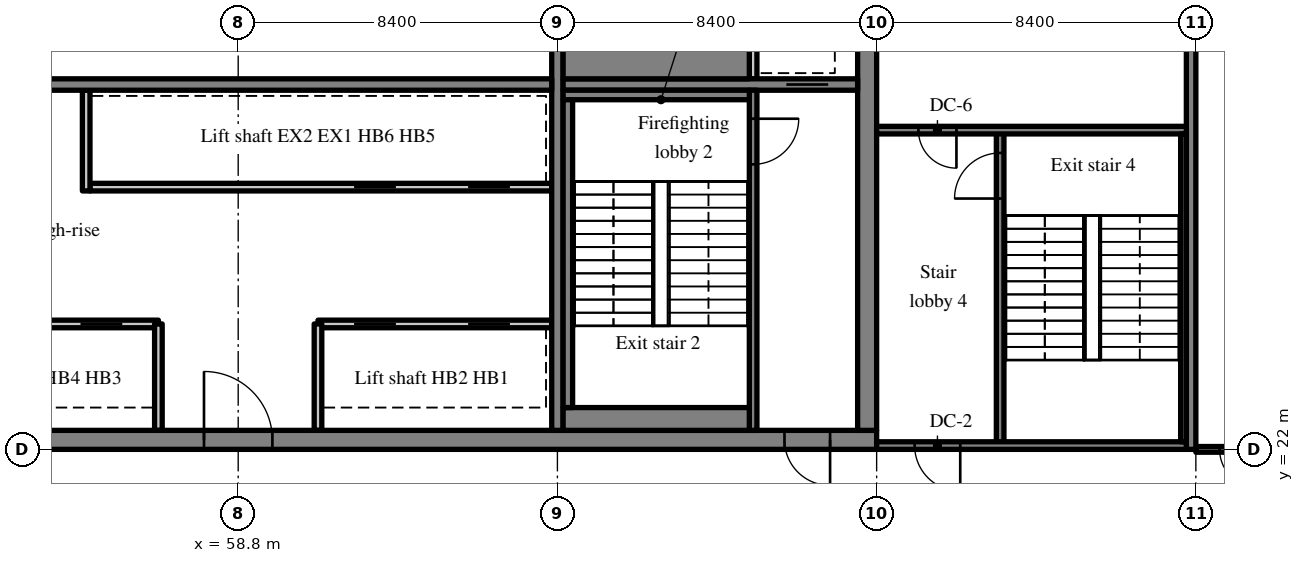
"""IFC4 building model, lengths in metres.
Left out: names, types, materials, properties, quantities, classifications, styles, units other than length and angle.
Written with IfcOpenShell. Run it as: python <this file> out.ifc"""

import sys

from ifc_helpers import new_model, si_unit, direction, frame, frame_2d, origin, place, context, subcontext, project, spatial, rectangle, extrude, source, transform, mapped, element, fill, save


model = new_model("IFC4")
c1 = context("Model", 3, precision=1e-05, world=origin(), true_north=direction((0.0, 1.0)))
c2 = subcontext(c1, "Body", "Model", "MODEL_VIEW")
j1 = project(units=[si_unit("LENGTHUNIT", "METRE"), si_unit("PLANEANGLEUNIT", "RADIAN")], contexts=[c1])
p1 = place(None, origin())
s1 = spatial("IfcSite", under=j1, at=p1, CompositionType="ELEMENT")
p2 = place(p1, origin())
s2 = spatial("IfcBuilding", under=s1, at=p2, CompositionType="ELEMENT")
p3 = place(p2, frame((0.0, 0.0, 309.7)))
s3 = spatial("IfcBuildingStorey", under=s2, at=p3, CompositionType="ELEMENT", Elevation=309.7)
m1 = source(origin(), c2, "Body", "SweptSolid", [
    extrude(rectangle(XDim=50.4, YDim=0.5, at=frame_2d((25.2, 0.0))), origin(), (0.0, 0.0, 1.0), 3.72),
])
p4 = place(p3, frame((25.2, 22.25, 0.0), z_axis=(0.0, 0.0, 1.0), x_axis=(1.0, 0.0, 0.0)))
e1 = element("IfcWall", 1, at=p4, inside=s3, PredefinedType="SHEAR", context=c2, shape_type="MappedRepresentation", body=[
    mapped(m1, transform((0.0, 0.0, 0.0), scale=1.0)),
])
m2 = source(origin(), c2, "Body", "SweptSolid", [
    extrude(rectangle(XDim=1.8, YDim=2.1, at=frame_2d((0.9, 1.05))), frame((0.0, 0.26, 0.0), z_axis=(0.0, -1.0, 0.0), x_axis=(1.0, 0.0, 0.0)), (0.0, 0.0, 1.0), 0.52),
])
p5 = place(p4, frame((15.9, 0.0, 0.0)))
e2 = element("IfcOpeningElement", 2, at=p5, cuts=e1, PredefinedType="OPENING", context=c2, shape_type="MappedRepresentation", body=[
    mapped(m2, transform((0.0, 0.0, 0.0), scale=1.0)),
])
m3 = source(origin(), c2, "Body", "SweptSolid", [
    extrude(rectangle(XDim=0.9, YDim=2.1, at=frame_2d((0.45, 1.05))), frame((0.0, 0.26, 0.0), z_axis=(0.0, -1.0, 0.0), x_axis=(1.0, 0.0, 0.0)), (0.0, 0.0, 1.0), 0.52),
])
p6 = place(p4, frame((11.175, 0.0, 0.0)))
e3 = element("IfcOpeningElement", 3, at=p6, cuts=e1, PredefinedType="OPENING", context=c2, shape_type="MappedRepresentation", body=[
    mapped(m3, transform((0.0, 0.0, 0.0), scale=1.0)),
])
p7 = place(p4, frame((21.525, 0.0, 0.0)))
e4 = element("IfcOpeningElement", 4, at=p7, cuts=e1, PredefinedType="OPENING", context=c2, shape_type="MappedRepresentation", body=[
    mapped(m3, transform((0.0, 0.0, 0.0), scale=1.0)),
])
p8 = place(p4, frame((32.7, 0.0, 0.0)))
e5 = element("IfcOpeningElement", 5, at=p8, cuts=e1, PredefinedType="OPENING", context=c2, shape_type="MappedRepresentation", body=[
    mapped(m2, transform((0.0, 0.0, 0.0), scale=1.0)),
])
m4 = source(origin(), c2, "Body", "SweptSolid", [
    extrude(rectangle(XDim=1.2, YDim=2.1, at=frame_2d((0.6, 1.05))), frame((0.0, 0.26, 0.0), z_axis=(0.0, -1.0, 0.0), x_axis=(1.0, 0.0, 0.0)), (0.0, 0.0, 1.0), 0.52),
])
p9 = place(p4, frame((6.5, 0.0, 0.0)))
e6 = element("IfcOpeningElement", 6, at=p9, cuts=e1, PredefinedType="OPENING", context=c2, shape_type="MappedRepresentation", body=[
    mapped(m4, transform((0.0, 0.0, 0.0), scale=1.0)),
])
p10 = place(p4, frame((47.975, 0.0, 0.0)))
e7 = element("IfcOpeningElement", 7, at=p10, cuts=e1, PredefinedType="OPENING", context=c2, shape_type="MappedRepresentation", body=[
    mapped(m4, transform((0.0, 0.0, 0.0), scale=1.0)),
])
m5 = source(origin(), c2, "Body", "SweptSolid", [
    extrude(rectangle(XDim=19.0, YDim=0.5, at=frame_2d((9.5, 0.0))), origin(), (0.0, 0.0, 1.0), 3.72),
])
p11 = place(p3, frame((75.35, 22.5, 0.0), z_axis=(0.0, 0.0, 1.0), x_axis=(0.0, 1.0, 0.0)))
e8 = element("IfcWall", 8, at=p11, inside=s3, PredefinedType="SHEAR", context=c2, shape_type="MappedRepresentation", body=[
    mapped(m5, transform((0.0, 0.0, 0.0), scale=1.0)),
])
p12 = place(p11, frame((12.9, 0.0, 0.0)))
e9 = element("IfcOpeningElement", 9, at=p12, cuts=e8, PredefinedType="OPENING", context=c2, shape_type="MappedRepresentation", body=[
    mapped(m4, transform((0.0, 0.0, 0.0), scale=1.0)),
])
m6 = source(origin(), c2, "Body", "SweptSolid", [
    extrude(rectangle(XDim=19.0, YDim=0.3, at=frame_2d((9.5, 0.0))), origin(), (0.0, 0.0, 1.0), 3.72),
])
p13 = place(p3, frame((67.2, 22.5, 0.0), z_axis=(0.0, 0.0, 1.0), x_axis=(0.0, 1.0, 0.0)))
e10 = element("IfcWall", 10, at=p13, inside=s3, PredefinedType="SHEAR", context=c2, shape_type="MappedRepresentation", body=[
    mapped(m6, transform((0.0, 0.0, 0.0), scale=1.0)),
])
m7 = source(origin(), c2, "Body", "SweptSolid", [
    extrude(rectangle(XDim=16.5, YDim=0.3, at=frame_2d((8.25, 0.0))), origin(), (0.0, 0.0, 1.0), 3.72),
])
p14 = place(p3, frame((50.55, 31.6, 0.0), z_axis=(0.0, 0.0, 1.0), x_axis=(1.0, 0.0, 0.0)))
e11 = element("IfcWall", 11, at=p14, inside=s3, PredefinedType="SHEAR", context=c2, shape_type="MappedRepresentation", body=[
    mapped(m7, transform((0.0, 0.0, 0.0), scale=1.0)),
])
m8 = source(origin(), c2, "Body", "SweptSolid", [
    extrude(rectangle(XDim=1.0, YDim=2.1, at=frame_2d((0.5, 1.05))), frame((0.0, 0.16, 0.0), z_axis=(0.0, -1.0, 0.0), x_axis=(1.0, 0.0, 0.0)), (0.0, 0.0, 1.0), 0.32),
])
p15 = place(p14, frame((0.625, 0.0, 0.0)))
e12 = element("IfcOpeningElement", 12, at=p15, cuts=e11, PredefinedType="OPENING", context=c2, shape_type="MappedRepresentation", body=[
    mapped(m8, transform((0.0, 0.0, 0.0), scale=1.0)),
])
m9 = source(origin(), c2, "Body", "SweptSolid", [
    extrude(rectangle(XDim=7.75, YDim=0.3, at=frame_2d((3.875, 0.0))), origin(), (0.0, 0.0, 1.0), 3.72),
])
p16 = place(p3, frame((67.35, 31.6, 0.0), z_axis=(0.0, 0.0, 1.0), x_axis=(1.0, 0.0, 0.0)))
e13 = element("IfcWall", 13, at=p16, inside=s3, PredefinedType="SHEAR", context=c2, shape_type="MappedRepresentation", body=[
    mapped(m9, transform((0.0, 0.0, 0.0), scale=1.0)),
])
m10 = source(origin(), c2, "Body", "SweptSolid", [
    extrude(rectangle(XDim=1.1, YDim=2.1, at=frame_2d((0.55, 1.05))), frame((0.0, 0.16, 0.0), z_axis=(0.0, -1.0, 0.0), x_axis=(1.0, 0.0, 0.0)), (0.0, 0.0, 1.0), 0.32),
])
p17 = place(p16, frame((5.875, 0.0, 0.0)))
e14 = element("IfcOpeningElement", 14, at=p17, cuts=e13, PredefinedType="OPENING", context=c2, shape_type="MappedRepresentation", body=[
    mapped(m10, transform((0.0, 0.0, 0.0), scale=1.0)),
])
m11 = source(origin(), c2, "Body", "SweptSolid", [
    extrude(rectangle(XDim=18.4, YDim=0.25, at=frame_2d((9.2, 0.0))), origin(), (0.0, 0.0, 1.0), 3.72),
])
p18 = place(p3, frame((83.875, 22.0, 0.0), z_axis=(0.0, 0.0, 1.0), x_axis=(0.0, 1.0, 0.0)))
e15 = element("IfcWall", 15, at=p18, inside=s3, PredefinedType="SHEAR", context=c2, shape_type="MappedRepresentation", body=[
    mapped(m11, transform((0.0, 0.0, 0.0), scale=1.0)),
])
m12 = source(origin(), c2, "Body", "SweptSolid", [
    extrude(rectangle(XDim=6.15, YDim=0.2, at=frame_2d((3.075, 0.0))), origin(), (0.0, 0.0, 1.0), 3.72),
])
p19 = place(p3, frame((67.05, 25.3, 0.0), z_axis=(0.0, 0.0, 1.0), x_axis=(-1.0, 0.0, 0.0)))
e16 = element("IfcWall", 16, at=p19, inside=s3, PredefinedType="SOLIDWALL", context=c2, shape_type="MappedRepresentation", body=[
    mapped(m12, transform((0.0, 0.0, 0.0), scale=1.0)),
])
m13 = source(origin(), c2, "Body", "SweptSolid", [
    extrude(rectangle(XDim=1.1, YDim=2.1, at=frame_2d((0.55, 1.05))), frame((0.0, 0.11, 0.0), z_axis=(0.0, -1.0, 0.0), x_axis=(1.0, 0.0, 0.0)), (0.0, 0.0, 1.0), 0.22),
])
p20 = place(p19, frame((1.1, 0.0, 0.0)))
e17 = element("IfcOpeningElement", 17, at=p20, cuts=e16, PredefinedType="OPENING", context=c2, shape_type="MappedRepresentation", body=[
    mapped(m13, transform((0.0, 0.0, 0.0), scale=1.0)),
])
p21 = place(p19, frame((4.1, 0.0, 0.0)))
e18 = element("IfcOpeningElement", 18, at=p21, cuts=e16, PredefinedType="OPENING", context=c2, shape_type="MappedRepresentation", body=[
    mapped(m13, transform((0.0, 0.0, 0.0), scale=1.0)),
])
m14 = source(origin(), c2, "Body", "SweptSolid", [
    extrude(rectangle(XDim=6.0, YDim=0.2, at=frame_2d((3.0, 0.0))), origin(), (0.0, 0.0, 1.0), 3.72),
])
p22 = place(p3, frame((56.7, 25.3, 0.0), z_axis=(0.0, 0.0, 1.0), x_axis=(-1.0, 0.0, 0.0)))
e19 = element("IfcWall", 19, at=p22, inside=s3, PredefinedType="SOLIDWALL", context=c2, shape_type="MappedRepresentation", body=[
    mapped(m14, transform((0.0, 0.0, 0.0), scale=1.0)),
])
p23 = place(p22, frame((0.95, 0.0, 0.0)))
e20 = element("IfcOpeningElement", 20, at=p23, cuts=e19, PredefinedType="OPENING", context=c2, shape_type="MappedRepresentation", body=[
    mapped(m13, transform((0.0, 0.0, 0.0), scale=1.0)),
])
p24 = place(p22, frame((3.95, 0.0, 0.0)))
e21 = element("IfcOpeningElement", 21, at=p24, cuts=e19, PredefinedType="OPENING", context=c2, shape_type="MappedRepresentation", body=[
    mapped(m13, transform((0.0, 0.0, 0.0), scale=1.0)),
])
m15 = source(origin(), c2, "Body", "SweptSolid", [
    extrude(rectangle(XDim=12.15, YDim=0.2, at=frame_2d((6.075, 0.0))), origin(), (0.0, 0.0, 1.0), 3.72),
])
p25 = place(p3, frame((67.05, 28.9, 0.0), z_axis=(0.0, 0.0, 1.0), x_axis=(-1.0, 0.0, 0.0)))
e22 = element("IfcWall", 22, at=p25, inside=s3, PredefinedType="SOLIDWALL", context=c2, shape_type="MappedRepresentation", body=[
    mapped(m15, transform((0.0, 0.0, 0.0), scale=1.0)),
])
p26 = place(p25, frame((1.1, 0.0, 0.0)))
e23 = element("IfcOpeningElement", 23, at=p26, cuts=e22, PredefinedType="OPENING", context=c2, shape_type="MappedRepresentation", body=[
    mapped(m13, transform((0.0, 0.0, 0.0), scale=1.0)),
])
p27 = place(p25, frame((4.1, 0.0, 0.0)))
e24 = element("IfcOpeningElement", 24, at=p27, cuts=e22, PredefinedType="OPENING", context=c2, shape_type="MappedRepresentation", body=[
    mapped(m13, transform((0.0, 0.0, 0.0), scale=1.0)),
])
m16 = source(origin(), c2, "Body", "SweptSolid", [
    extrude(rectangle(XDim=2.8, YDim=0.2, at=frame_2d((1.4, 0.0))), origin(), (0.0, 0.0, 1.0), 3.72),
])
for number, where, z_axis, x_axis in (
    (25, (60.9, 22.5, 0.0), (0.0, 0.0, 1.0), (0.0, 1.0, 0.0)),
    (26, (56.7, 22.5, 0.0), (0.0, 0.0, 1.0), (0.0, 1.0, 0.0)),
):
    element("IfcWall", number, at=place(p3, frame(where, z_axis=z_axis, x_axis=x_axis)), inside=s3, PredefinedType="SOLIDWALL", context=c2, shape_type="MappedRepresentation", body=[
        mapped(m16, transform((0.0, 0.0, 0.0), scale=1.0)),
    ])
m17 = source(origin(), c2, "Body", "SweptSolid", [
    extrude(rectangle(XDim=2.65, YDim=0.2, at=frame_2d((1.325, 0.0))), origin(), (0.0, 0.0, 1.0), 3.72),
])
p28 = place(p3, frame((54.8, 28.8, 0.0), z_axis=(0.0, 0.0, 1.0), x_axis=(0.0, 1.0, 0.0)))
e27 = element("IfcWall", 27, at=p28, inside=s3, PredefinedType="SOLIDWALL", context=c2, shape_type="MappedRepresentation", body=[
    mapped(m17, transform((0.0, 0.0, 0.0), scale=1.0)),
])
m18 = source(origin(), c2, "Body", "SweptSolid", [
    extrude(rectangle(XDim=8.95, YDim=0.2, at=frame_2d((4.475, 0.0))), origin(), (0.0, 0.0, 1.0), 3.72),
])
p29 = place(p3, frame((72.35, 22.5, 0.0), z_axis=(0.0, 0.0, 1.0), x_axis=(0.0, 1.0, 0.0)))
e28 = element("IfcWall", 28, at=p29, inside=s3, PredefinedType="SOLIDWALL", context=c2, shape_type="MappedRepresentation", body=[
    mapped(m18, transform((0.0, 0.0, 0.0), scale=1.0)),
])
m19 = source(origin(), c2, "Body", "SweptSolid", [
    extrude(rectangle(XDim=1.2, YDim=2.1, at=frame_2d((0.6, 1.05))), frame((0.0, 0.11, 0.0), z_axis=(0.0, -1.0, 0.0), x_axis=(1.0, 0.0, 0.0)), (0.0, 0.0, 1.0), 0.22),
])
p30 = place(p29, frame((7.0, 0.0, 0.0)))
e29 = element("IfcOpeningElement", 29, at=p30, cuts=e28, PredefinedType="OPENING", context=c2, shape_type="MappedRepresentation", body=[
    mapped(m19, transform((0.0, 0.0, 0.0), scale=1.0)),
])
m20 = source(origin(), c2, "Body", "SweptSolid", [
    extrude(rectangle(XDim=1.85, YDim=0.2, at=frame_2d((0.925, 0.0))), origin(), (0.0, 0.0, 1.0), 3.72),
])
p31 = place(p3, frame((72.35, 31.75, 0.0), z_axis=(0.0, 0.0, 1.0), x_axis=(0.0, 1.0, 0.0)))
e30 = element("IfcWall", 30, at=p31, inside=s3, PredefinedType="SOLIDWALL", context=c2, shape_type="MappedRepresentation", body=[
    mapped(m20, transform((0.0, 0.0, 0.0), scale=1.0)),
])
m21 = source(origin(), c2, "Body", "SweptSolid", [
    extrude(rectangle(XDim=8.3, YDim=0.2, at=frame_2d((4.15, 0.0))), origin(), (0.0, 0.0, 1.0), 3.72),
])
p32 = place(p3, frame((78.85, 22.1, 0.0), z_axis=(0.0, 0.0, 1.0), x_axis=(0.0, 1.0, 0.0)))
e31 = element("IfcWall", 31, at=p32, inside=s3, PredefinedType="SOLIDWALL", context=c2, shape_type="MappedRepresentation", body=[
    mapped(m21, transform((0.0, 0.0, 0.0), scale=1.0)),
])
p33 = place(p32, frame((6.5, 0.0, 0.0)))
e32 = element("IfcOpeningElement", 32, at=p33, cuts=e31, PredefinedType="OPENING", context=c2, shape_type="MappedRepresentation", body=[
    mapped(m19, transform((0.0, 0.0, 0.0), scale=1.0)),
])
m22 = source(origin(), c2, "Body", "SweptSolid", [
    extrude(rectangle(XDim=8.15, YDim=0.2, at=frame_2d((4.075, 0.0))), origin(), (0.0, 0.0, 1.0), 3.72),
])
p34 = place(p3, frame((83.75, 22.1, 0.0), z_axis=(0.0, 0.0, 1.0), x_axis=(-1.0, 0.0, 0.0)))
e33 = element("IfcWall", 33, at=p34, inside=s3, PredefinedType="SOLIDWALL", context=c2, shape_type="MappedRepresentation", body=[
    mapped(m22, transform((0.0, 0.0, 0.0), scale=1.0)),
])
p35 = place(p34, frame((5.95, 0.0, 0.0)))
e34 = element("IfcOpeningElement", 34, at=p35, cuts=e33, PredefinedType="OPENING", context=c2, shape_type="MappedRepresentation", body=[
    mapped(m19, transform((0.0, 0.0, 0.0), scale=1.0)),
])
p36 = place(p3, frame((83.75, 30.4, 0.0), z_axis=(0.0, 0.0, 1.0), x_axis=(-1.0, 0.0, 0.0)))
e35 = element("IfcWall", 35, at=p36, inside=s3, PredefinedType="SOLIDWALL", context=c2, shape_type="MappedRepresentation", body=[
    mapped(m22, transform((0.0, 0.0, 0.0), scale=1.0)),
])
m23 = source(origin(), c2, "Body", "SweptSolid", [
    extrude(rectangle(XDim=1.0, YDim=2.1, at=frame_2d((0.5, 1.05))), frame((0.0, 0.11, 0.0), z_axis=(0.0, -1.0, 0.0), x_axis=(1.0, 0.0, 0.0)), (0.0, 0.0, 1.0), 0.22),
])
p37 = place(p36, frame((6.05, 0.0, 0.0)))
e36 = element("IfcOpeningElement", 36, at=p37, cuts=e35, PredefinedType="OPENING", context=c2, shape_type="MappedRepresentation", body=[
    mapped(m23, transform((0.0, 0.0, 0.0), scale=1.0)),
])
m24 = source(origin(), c2, "Body", "SweptSolid", [
    extrude(rectangle(XDim=4.9, YDim=0.6, at=frame_2d((2.45, 0.0))), origin(), (0.0, 0.0, 1.0), 3.72),
])
p38 = place(p3, frame((67.35, 22.8, 0.0), z_axis=(0.0, 0.0, 1.0), x_axis=(1.0, 0.0, 0.0)))
e37 = element("IfcWall", 37, at=p38, inside=s3, PredefinedType="SOLIDWALL", context=c2, shape_type="MappedRepresentation", body=[
    mapped(m24, transform((0.0, 0.0, 0.0), scale=1.0)),
])
m25 = source(origin(), c2, "Body", "SweptSolid", [
    extrude(rectangle(XDim=4.9, YDim=0.25, at=frame_2d((2.45, 0.0))), origin(), (0.0, 0.0, 1.0), 3.72),
])
p39 = place(p3, frame((67.35, 31.325, 0.0), z_axis=(0.0, 0.0, 1.0), x_axis=(1.0, 0.0, 0.0)))
e38 = element("IfcWall", 38, at=p39, inside=s3, PredefinedType="SOLIDWALL", context=c2, shape_type="MappedRepresentation", body=[
    mapped(m25, transform((0.0, 0.0, 0.0), scale=1.0)),
])
m26 = source(origin(), c2, "Body", "SweptSolid", [
    extrude(rectangle(XDim=8.1, YDim=0.25, at=frame_2d((4.05, 0.0))), origin(), (0.0, 0.0, 1.0), 3.72),
])
p40 = place(p3, frame((67.475, 23.1, 0.0), z_axis=(0.0, 0.0, 1.0), x_axis=(0.0, 1.0, 0.0)))
e39 = element("IfcWall", 39, at=p40, inside=s3, PredefinedType="SOLIDWALL", context=c2, shape_type="MappedRepresentation", body=[
    mapped(m26, transform((0.0, 0.0, 0.0), scale=1.0)),
])
m27 = source(origin(), c2, "Body", "SweptSolid", [
    extrude(rectangle(XDim=4.9, YDim=1.05, at=frame_2d((2.45, 0.0))), origin(), (0.0, 0.0, 1.0), 3.72),
])
p41 = place(p3, frame((67.35, 32.275, 0.0), z_axis=(0.0, 0.0, 1.0), x_axis=(1.0, 0.0, 0.0)))
e40 = element("IfcWall", 40, at=p41, inside=s3, PredefinedType="SOLIDWALL", context=c2, shape_type="MappedRepresentation", body=[
    mapped(m27, transform((0.0, 0.0, 0.0), scale=1.0)),
])
m28 = source(origin(), c2, "Body", "SweptSolid", [
    extrude(rectangle(XDim=8.1, YDim=0.15, at=frame_2d((4.05, 0.0))), origin(), (0.0, 0.0, 1.0), 3.72),
])
p42 = place(p3, frame((83.675, 22.2, 0.0), z_axis=(0.0, 0.0, 1.0), x_axis=(0.0, 1.0, 0.0)))
e41 = element("IfcWall", 41, at=p42, inside=s3, PredefinedType="SOLIDWALL", context=c2, shape_type="MappedRepresentation", body=[
    mapped(m28, transform((0.0, 0.0, 0.0), scale=1.0)),
])
m29 = source(origin(), c2, "Body", "SweptSolid", [
    extrude(rectangle(XDim=1.9, YDim=0.15, at=frame_2d((0.95, 0.0))), origin(), (0.0, 0.0, 1.0), 3.02),
])
p43 = place(p3, frame((84.0, 22.0, 0.0), z_axis=(0.0, 0.0, 1.0), x_axis=(1.0, 0.0, 0.0)))
e42 = element("IfcWall", 42, at=p43, inside=s3, PredefinedType="PARTITIONING", context=c2, shape_type="MappedRepresentation", body=[
    mapped(m29, transform((0.0, 0.0, 0.0), scale=1.0)),
])
m30 = source(origin(), c2, "Body", "SweptSolid", [
    extrude(rectangle(XDim=1.0, YDim=2.1, at=frame_2d((0.5, 1.05))), frame((0.0, 0.085, 0.0), z_axis=(0.0, -1.0, 0.0), x_axis=(1.0, 0.0, 0.0)), (0.0, 0.0, 1.0), 0.17),
])
p44 = place(p43, frame((0.625, 0.0, 0.0)))
e43 = element("IfcOpeningElement", 43, at=p44, cuts=e42, PredefinedType="OPENING", context=c2, shape_type="MappedRepresentation", body=[
    mapped(m30, transform((0.0, 0.0, 0.0), scale=1.0)),
])
m31 = source(origin(), c2, "Body", "SweptSolid", [
    extrude(rectangle(XDim=1.8, YDim=2.1, at=frame_2d((0.9, 1.05))), frame((0.0, 0.175, 0.0), z_axis=(0.0, -1.0, 0.0), x_axis=(1.0, 0.0, 0.0)), (0.0, 0.0, 1.0), 0.05),
])
p45 = place(p8, origin())
e44 = element("IfcDoor", 44, at=p45, inside=s3, OperationType="DOUBLE_DOOR_SINGLE_SWING", PredefinedType="DOOR", context=c2, shape_type="MappedRepresentation", body=[
    mapped(m31, transform((0.0, 0.0, 0.0), scale=1.0)),
])
fill(e5, e44)
m32 = source(origin(), c2, "Body", "SweptSolid", [
    extrude(rectangle(XDim=1.1, YDim=2.1, at=frame_2d((0.55, 1.05))), frame((0.0, 0.025, 0.0), z_axis=(0.0, -1.0, 0.0), x_axis=(1.0, 0.0, 0.0)), (0.0, 0.0, 1.0), 0.05),
])
p46 = place(p20, origin())
e45 = element("IfcDoor", 45, at=p46, inside=s3, OperationType="SLIDING_TO_RIGHT", PredefinedType="DOOR", context=c2, shape_type="MappedRepresentation", body=[
    mapped(m32, transform((0.0, 0.0, 0.0), scale=1.0)),
])
fill(e17, e45)
p47 = place(p21, origin())
e46 = element("IfcDoor", 46, at=p47, inside=s3, OperationType="SLIDING_TO_LEFT", PredefinedType="DOOR", context=c2, shape_type="MappedRepresentation", body=[
    mapped(m32, transform((0.0, 0.0, 0.0), scale=1.0)),
])
fill(e18, e46)
p48 = place(p23, origin())
e47 = element("IfcDoor", 47, at=p48, inside=s3, OperationType="SLIDING_TO_RIGHT", PredefinedType="DOOR", context=c2, shape_type="MappedRepresentation", body=[
    mapped(m32, transform((0.0, 0.0, 0.0), scale=1.0)),
])
fill(e20, e47)
p49 = place(p26, origin())
e48 = element("IfcDoor", 48, at=p49, inside=s3, OperationType="SLIDING_TO_RIGHT", PredefinedType="DOOR", context=c2, shape_type="MappedRepresentation", body=[
    mapped(m32, transform((0.0, 0.0, 0.0), scale=1.0)),
])
fill(e23, e48)
p50 = place(p27, origin())
e49 = element("IfcDoor", 49, at=p50, inside=s3, OperationType="SLIDING_TO_LEFT", PredefinedType="DOOR", context=c2, shape_type="MappedRepresentation", body=[
    mapped(m32, transform((0.0, 0.0, 0.0), scale=1.0)),
])
fill(e24, e49)
m33 = source(origin(), c2, "Body", "SweptSolid", [
    extrude(rectangle(XDim=1.2, YDim=2.1, at=frame_2d((0.6, 1.05))), frame((0.0, 0.025, 0.0), z_axis=(0.0, -1.0, 0.0), x_axis=(1.0, 0.0, 0.0)), (0.0, 0.0, 1.0), 0.05),
])
p51 = place(p30, origin())
e50 = element("IfcDoor", 50, at=p51, inside=s3, OperationType="SINGLE_SWING_RIGHT", PredefinedType="DOOR", context=c2, shape_type="MappedRepresentation", body=[
    mapped(m33, transform((0.0, 0.0, 0.0), scale=1.0)),
])
fill(e29, e50)
m34 = source(origin(), c2, "Body", "SweptSolid", [
    extrude(rectangle(XDim=1.2, YDim=2.1, at=frame_2d((0.6, 1.05))), frame((0.0, 0.175, 0.0), z_axis=(0.0, -1.0, 0.0), x_axis=(1.0, 0.0, 0.0)), (0.0, 0.0, 1.0), 0.05),
])
p52 = place(p10, origin())
e51 = element("IfcDoor", 51, at=p52, inside=s3, OperationType="SINGLE_SWING_RIGHT", PredefinedType="DOOR", context=c2, shape_type="MappedRepresentation", body=[
    mapped(m34, transform((0.0, 0.0, 0.0), scale=1.0)),
])
fill(e7, e51)
p53 = place(p17, origin())
e52 = element("IfcDoor", 52, at=p53, inside=s3, OperationType="SLIDING_TO_LEFT", PredefinedType="DOOR", context=c2, shape_type="MappedRepresentation", body=[
    mapped(m32, transform((0.0, 0.0, 0.0), scale=1.0)),
])
fill(e14, e52)
p54 = place(p33, origin())
e53 = element("IfcDoor", 53, at=p54, inside=s3, OperationType="SINGLE_SWING_LEFT", PredefinedType="DOOR", context=c2, shape_type="MappedRepresentation", body=[
    mapped(m33, transform((0.0, 0.0, 0.0), scale=1.0)),
])
fill(e32, e53)
p55 = place(p35, origin())
e54 = element("IfcDoor", 54, at=p55, inside=s3, OperationType="SINGLE_SWING_LEFT", PredefinedType="DOOR", context=c2, shape_type="MappedRepresentation", body=[
    mapped(m33, transform((0.0, 0.0, 0.0), scale=1.0)),
])
fill(e34, e54)
m35 = source(origin(), c2, "Body", "SweptSolid", [
    extrude(rectangle(XDim=1.0, YDim=2.1, at=frame_2d((0.5, 1.05))), frame((0.0, 0.025, 0.0), z_axis=(0.0, -1.0, 0.0), x_axis=(1.0, 0.0, 0.0)), (0.0, 0.0, 1.0), 0.05),
])
p56 = place(p37, origin())
e55 = element("IfcDoor", 55, at=p56, inside=s3, OperationType="SINGLE_SWING_LEFT", PredefinedType="DOOR", context=c2, shape_type="MappedRepresentation", body=[
    mapped(m35, transform((0.0, 0.0, 0.0), scale=1.0)),
])
fill(e36, e55)
p57 = place(p44, origin())
e56 = element("IfcDoor", 56, at=p57, inside=s3, OperationType="SINGLE_SWING_RIGHT", PredefinedType="DOOR", context=c2, shape_type="MappedRepresentation", body=[
    mapped(m35, transform((0.0, 0.0, 0.0), scale=1.0)),
])
fill(e43, e56)
save(model, sys.argv[1])
